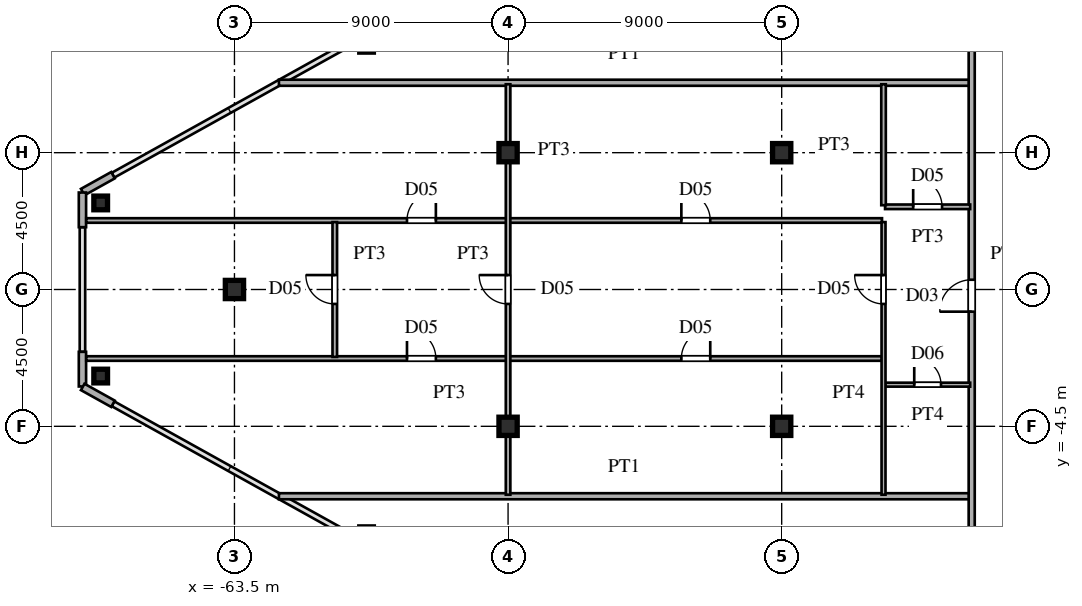
"""IFC4 building model, lengths in metres.
Left out: names, types, materials, properties, quantities, classifications, styles, units other than length and angle.
Written with IfcOpenShell. Run it as: python <this file> out.ifc"""

import sys

from ifc_helpers import new_model, si_unit, direction, frame, frame_2d, origin, origin_2d, place, context, subcontext, project, spatial, rectangle, hollow_rectangle, i_section, extrude, source, transform, mapped, element, fill, save


model = new_model("IFC4")
c1 = context("Model", 3, precision=1e-05, world=origin(), true_north=direction((0.0, 1.0)))
c2 = subcontext(c1, "Body", "Model", "MODEL_VIEW")
j1 = project(units=[si_unit("LENGTHUNIT", "METRE"), si_unit("PLANEANGLEUNIT", "RADIAN")], contexts=[c1])
p1 = place(None, origin())
s1 = spatial("IfcSite", under=j1, at=p1, CompositionType="ELEMENT")
p2 = place(p1, origin())
s2 = spatial("IfcBuilding", under=s1, at=p2, CompositionType="ELEMENT")
p3 = place(p2, frame((0.0, 0.0, 192.3)))
s3 = spatial("IfcBuildingStorey", under=s2, at=p3, CompositionType="ELEMENT", Elevation=192.3)
m1 = source(origin(), c2, "Body", "SweptSolid", [
    extrude(i_section(OverallWidth=0.6, OverallDepth=0.6, WebThickness=0.025, FlangeThickness=0.04, at=origin_2d()), origin(), (0.0, 0.0, 1.0), 3.6),
])
for number, where, z_axis, x_axis in (
    (1, (-45.5, -4.5, 0.0), (0.0, 0.0, 1.0), (1.0, 0.0, 0.0)),
    (2, (-45.5, 4.5, 0.0), (0.0, 0.0, 1.0), (1.0, 0.0, 0.0)),
    (3, (-54.5, -4.5, 0.0), (0.0, 0.0, 1.0), (1.0, 0.0, 0.0)),
    (4, (-54.5, 4.5, 0.0), (0.0, 0.0, 1.0), (1.0, 0.0, 0.0)),
    (5, (-63.5, 0.0, 0.0), (0.0, 0.0, 1.0), (1.0, 0.0, 0.0)),
):
    element("IfcColumn", number, at=place(p3, frame(where, z_axis=z_axis, x_axis=x_axis)), inside=s3, PredefinedType="COLUMN", context=c2, shape_type="MappedRepresentation", body=[
        mapped(m1, transform((0.0, 0.0, 0.0), scale=1.0)),
    ])
m2 = source(origin(), c2, "Body", "SweptSolid", [
    extrude(hollow_rectangle(XDim=0.45, YDim=0.45, WallThickness=0.018, at=origin_2d()), origin(), (0.0, 0.0, 1.0), 3.6),
])
for number, where, z_axis, x_axis in (
    (6, (-67.9, 2.847, 0.0), (0.0, 0.0, 1.0), (1.0, 0.0, 0.0)),
    (7, (-67.9, -2.847, 0.0), (0.0, 0.0, 1.0), (1.0, 0.0, 0.0)),
):
    element("IfcColumn", number, at=place(p3, frame(where, z_axis=z_axis, x_axis=x_axis)), inside=s3, PredefinedType="COLUMN", context=c2, shape_type="MappedRepresentation", body=[
        mapped(m2, transform((0.0, 0.0, 0.0), scale=1.0)),
    ])
for number, where, z_axis, x_axis in (
    (8, (-67.495, 3.759, 0.0), (0.0, 0.0, 1.0), (-0.874, -0.486, 0.0)),
    (9, (-68.5, 3.19, 0.0), (0.0, 0.0, 1.0), (0.0, -1.0, 0.0)),
    (10, (-68.5, -2.05, 0.0), (0.0, 0.0, 1.0), (0.0, -1.0, 0.0)),
    (11, (-68.491, -3.205, 0.0), (0.0, 0.0, 1.0), (0.874, -0.486, 0.0)),
):
    element("IfcWall", number, at=place(p3, frame(where, z_axis=z_axis, x_axis=x_axis)), inside=s3, PredefinedType="SOLIDWALL", context=c2, shape_type="SweptSolid", body=[
        extrude(rectangle(XDim=1.14, YDim=0.24, at=frame_2d((0.57, 0.0))), origin(), (0.0, 0.0, 1.0), 3.38),
    ])
p4 = place(p3, frame((-62.037, -6.8, 0.0), z_axis=(0.0, 0.0, 1.0), x_axis=(1.0, 0.0, 0.0)))
e12 = element("IfcWall", 12, at=p4, inside=s3, PredefinedType="PARTITIONING", context=c2, shape_type="SweptSolid", body=[
    extrude(rectangle(XDim=22.707, YDim=0.2, at=frame_2d((11.354, 0.0))), origin(), (0.0, 0.0, 1.0), 3.38),
])
p5 = place(p3, frame((-42.1, -3.13, 0.0), z_axis=(0.0, 0.0, 1.0), x_axis=(1.0, 0.0, 0.0)))
e13 = element("IfcWall", 13, at=p5, inside=s3, PredefinedType="PARTITIONING", context=c2, shape_type="SweptSolid", body=[
    extrude(rectangle(XDim=2.8, YDim=0.13, at=frame_2d((1.4, 0.0))), origin(), (0.0, 0.0, 1.0), 3.38),
])
p6 = place(p5, frame((0.96, 0.0, 0.0)))
e14 = element("IfcOpeningElement", 14, at=p6, cuts=e13, PredefinedType="OPENING", context=c2, shape_type="SweptSolid", body=[
    extrude(rectangle(XDim=0.88, YDim=2.1, at=frame_2d((0.44, 1.05))), frame((0.0, 0.075, 0.0), z_axis=(0.0, -1.0, 0.0), x_axis=(1.0, 0.0, 0.0)), (0.0, 0.0, 1.0), 0.15),
])
p7 = place(p3, frame((-68.375, -2.27, 0.0), z_axis=(0.0, 0.0, 1.0), x_axis=(1.0, 0.0, 0.0)))
e15 = element("IfcWall", 15, at=p7, inside=s3, PredefinedType="PARTITIONING", context=c2, shape_type="SweptSolid", body=[
    extrude(rectangle(XDim=26.175, YDim=0.15, at=frame_2d((13.087, 0.0))), origin(), (0.0, 0.0, 1.0), 3.38),
])
p8 = place(p7, frame((19.575, 0.0, 0.0)))
e16 = element("IfcOpeningElement", 16, at=p8, cuts=e15, PredefinedType="OPENING", context=c2, shape_type="SweptSolid", body=[
    extrude(rectangle(XDim=0.95, YDim=2.15, at=frame_2d((0.475, 1.075))), frame((0.0, 0.085, 0.0), z_axis=(0.0, -1.0, 0.0), x_axis=(1.0, 0.0, 0.0)), (0.0, 0.0, 1.0), 0.17),
])
p9 = place(p7, frame((10.55, 0.0, 0.0)))
e17 = element("IfcOpeningElement", 17, at=p9, cuts=e15, PredefinedType="OPENING", context=c2, shape_type="SweptSolid", body=[
    extrude(rectangle(XDim=0.95, YDim=2.15, at=frame_2d((0.475, 1.075))), frame((0.0, 0.085, 0.0), z_axis=(0.0, -1.0, 0.0), x_axis=(1.0, 0.0, 0.0)), (0.0, 0.0, 1.0), 0.17),
])
p10 = place(p3, frame((-68.375, 2.27, 0.0), z_axis=(0.0, 0.0, 1.0), x_axis=(1.0, 0.0, 0.0)))
e18 = element("IfcWall", 18, at=p10, inside=s3, PredefinedType="PARTITIONING", context=c2, shape_type="SweptSolid", body=[
    extrude(rectangle(XDim=26.175, YDim=0.15, at=frame_2d((13.087, 0.0))), origin(), (0.0, 0.0, 1.0), 3.38),
])
p11 = place(p10, frame((19.575, 0.0, 0.0)))
e19 = element("IfcOpeningElement", 19, at=p11, cuts=e18, PredefinedType="OPENING", context=c2, shape_type="SweptSolid", body=[
    extrude(rectangle(XDim=0.95, YDim=2.15, at=frame_2d((0.475, 1.075))), frame((0.0, 0.085, 0.0), z_axis=(0.0, -1.0, 0.0), x_axis=(1.0, 0.0, 0.0)), (0.0, 0.0, 1.0), 0.17),
])
p12 = place(p10, frame((10.55, 0.0, 0.0)))
e20 = element("IfcOpeningElement", 20, at=p12, cuts=e18, PredefinedType="OPENING", context=c2, shape_type="SweptSolid", body=[
    extrude(rectangle(XDim=0.95, YDim=2.15, at=frame_2d((0.475, 1.075))), frame((0.0, 0.085, 0.0), z_axis=(0.0, -1.0, 0.0), x_axis=(1.0, 0.0, 0.0)), (0.0, 0.0, 1.0), 0.17),
])
p13 = place(p3, frame((-42.1, 2.72, 0.0), z_axis=(0.0, 0.0, 1.0), x_axis=(1.0, 0.0, 0.0)))
e21 = element("IfcWall", 21, at=p13, inside=s3, PredefinedType="PARTITIONING", context=c2, shape_type="SweptSolid", body=[
    extrude(rectangle(XDim=2.8, YDim=0.15, at=frame_2d((1.4, 0.0))), origin(), (0.0, 0.0, 1.0), 3.38),
])
p14 = place(p13, frame((0.925, 0.0, 0.0)))
e22 = element("IfcOpeningElement", 22, at=p14, cuts=e21, PredefinedType="OPENING", context=c2, shape_type="SweptSolid", body=[
    extrude(rectangle(XDim=0.95, YDim=2.15, at=frame_2d((0.475, 1.075))), frame((0.0, 0.085, 0.0), z_axis=(0.0, -1.0, 0.0), x_axis=(1.0, 0.0, 0.0)), (0.0, 0.0, 1.0), 0.17),
])
p15 = place(p3, frame((-62.037, 6.8, 0.0), z_axis=(0.0, 0.0, 1.0), x_axis=(1.0, 0.0, 0.0)))
e23 = element("IfcWall", 23, at=p15, inside=s3, PredefinedType="PARTITIONING", context=c2, shape_type="SweptSolid", body=[
    extrude(rectangle(XDim=22.707, YDim=0.2, at=frame_2d((11.354, 0.0))), origin(), (0.0, 0.0, 1.0), 3.38),
])
p16 = place(p3, frame((-60.2, -2.217, 0.0), z_axis=(0.0, 0.0, 1.0), x_axis=(0.0, 1.0, 0.0)))
e24 = element("IfcWall", 24, at=p16, inside=s3, PredefinedType="PARTITIONING", context=c2, shape_type="SweptSolid", body=[
    extrude(rectangle(XDim=4.434, YDim=0.15, at=frame_2d((2.217, 0.0))), origin(), (0.0, 0.0, 1.0), 3.38),
])
p17 = place(p16, frame((1.742, 0.0, 0.0)))
e25 = element("IfcOpeningElement", 25, at=p17, cuts=e24, PredefinedType="OPENING", context=c2, shape_type="SweptSolid", body=[
    extrude(rectangle(XDim=0.95, YDim=2.15, at=frame_2d((0.475, 1.075))), frame((0.0, 0.085, 0.0), z_axis=(0.0, -1.0, 0.0), x_axis=(1.0, 0.0, 0.0)), (0.0, 0.0, 1.0), 0.17),
])
p18 = place(p3, frame((-54.5, -6.75, 0.0), z_axis=(0.0, 0.0, 1.0), x_axis=(0.0, 1.0, 0.0)))
e26 = element("IfcWall", 26, at=p18, inside=s3, PredefinedType="PARTITIONING", context=c2, shape_type="SweptSolid", body=[
    extrude(rectangle(XDim=13.5, YDim=0.15, at=frame_2d((6.75, 0.0))), origin(), (0.0, 0.0, 1.0), 2.78),
])
p19 = place(p18, frame((6.275, 0.0, 0.0)))
e27 = element("IfcOpeningElement", 27, at=p19, cuts=e26, PredefinedType="OPENING", context=c2, shape_type="SweptSolid", body=[
    extrude(rectangle(XDim=0.95, YDim=2.15, at=frame_2d((0.475, 1.075))), frame((0.0, 0.085, 0.0), z_axis=(0.0, -1.0, 0.0), x_axis=(1.0, 0.0, 0.0)), (0.0, 0.0, 1.0), 0.17),
])
p20 = place(p3, frame((-42.15, -6.75, 0.0), z_axis=(0.0, 0.0, 1.0), x_axis=(0.0, 1.0, 0.0)))
e28 = element("IfcWall", 28, at=p20, inside=s3, PredefinedType="PARTITIONING", context=c2, shape_type="SweptSolid", body=[
    extrude(rectangle(XDim=8.967, YDim=0.13, at=frame_2d((4.483, 0.0))), origin(), (0.0, 0.0, 1.0), 3.38),
])
p21 = place(p20, frame((6.275, 0.0, 0.0)))
e29 = element("IfcOpeningElement", 29, at=p21, cuts=e28, PredefinedType="OPENING", context=c2, shape_type="SweptSolid", body=[
    extrude(rectangle(XDim=0.95, YDim=2.15, at=frame_2d((0.475, 1.075))), frame((0.0, 0.075, 0.0), z_axis=(0.0, -1.0, 0.0), x_axis=(1.0, 0.0, 0.0)), (0.0, 0.0, 1.0), 0.15),
])
p22 = place(p3, frame((-42.15, 2.772, 0.0), z_axis=(0.0, 0.0, 1.0), x_axis=(0.0, 1.0, 0.0)))
e30 = element("IfcWall", 30, at=p22, inside=s3, PredefinedType="PARTITIONING", context=c2, shape_type="SweptSolid", body=[
    extrude(rectangle(XDim=3.978, YDim=0.15, at=frame_2d((1.989, 0.0))), origin(), (0.0, 0.0, 1.0), 3.38),
])
p23 = place(p3, frame((-39.25, -15.715, 0.0), z_axis=(0.0, 0.0, 1.0), x_axis=(0.0, 1.0, 0.0)))
e31 = element("IfcWall", 31, at=p23, inside=s3, PredefinedType="PARTITIONING", context=c2, shape_type="SweptSolid", body=[
    extrude(rectangle(XDim=31.43, YDim=0.2, at=frame_2d((15.715, 0.0))), origin(), (0.0, 0.0, 1.0), 3.38),
])
p24 = place(p23, frame((3.89, 0.0, 0.0)))
e32 = element("IfcOpeningElement", 32, at=p24, cuts=e31, PredefinedType="OPENING", context=c2, shape_type="SweptSolid", body=[
    extrude(rectangle(XDim=1.05, YDim=2.25, at=frame_2d((0.525, 1.125))), frame((0.0, 0.11, 0.0), z_axis=(0.0, -1.0, 0.0), x_axis=(1.0, 0.0, 0.0)), (0.0, 0.0, 1.0), 0.22),
])
p25 = place(p23, frame((14.986, 0.0, 0.0)))
e33 = element("IfcOpeningElement", 33, at=p25, cuts=e31, PredefinedType="OPENING", context=c2, shape_type="SweptSolid", body=[
    extrude(rectangle(XDim=1.05, YDim=2.25, at=frame_2d((0.525, 1.125))), frame((0.0, 0.11, 0.0), z_axis=(0.0, -1.0, 0.0), x_axis=(1.0, 0.0, 0.0)), (0.0, 0.0, 1.0), 0.22),
])
p26 = place(p23, frame((26.49, 0.0, 0.0)))
e34 = element("IfcOpeningElement", 34, at=p26, cuts=e31, PredefinedType="OPENING", context=c2, shape_type="SweptSolid", body=[
    extrude(rectangle(XDim=1.05, YDim=2.25, at=frame_2d((0.525, 1.125))), frame((0.0, 0.11, 0.0), z_axis=(0.0, -1.0, 0.0), x_axis=(1.0, 0.0, 0.0)), (0.0, 0.0, 1.0), 0.22),
])
m3 = source(origin(), c2, "Body", "SweptSolid", [
    extrude(rectangle(XDim=0.88, YDim=2.1, at=frame_2d((0.44, 1.05))), frame((0.0, 0.025, 0.0), z_axis=(0.0, -1.0, 0.0), x_axis=(1.0, 0.0, 0.0)), (0.0, 0.0, 1.0), 0.05),
])
p27 = place(p6, origin())
e35 = element("IfcDoor", 35, at=p27, inside=s3, OperationType="SINGLE_SWING_LEFT", PredefinedType="DOOR", context=c2, shape_type="MappedRepresentation", body=[
    mapped(m3, transform((0.0, 0.0, 0.0), scale=1.0)),
])
fill(e14, e35)
m4 = source(origin(), c2, "Body", "SweptSolid", [
    extrude(rectangle(XDim=0.95, YDim=2.15, at=frame_2d((0.475, 1.075))), frame((0.0, 0.025, 0.0), z_axis=(0.0, -1.0, 0.0), x_axis=(1.0, 0.0, 0.0)), (0.0, 0.0, 1.0), 0.05),
])
p28 = place(p8, origin())
e36 = element("IfcDoor", 36, at=p28, inside=s3, OperationType="SINGLE_SWING_RIGHT", PredefinedType="DOOR", context=c2, shape_type="MappedRepresentation", body=[
    mapped(m4, transform((0.0, 0.0, 0.0), scale=1.0)),
])
fill(e16, e36)
p29 = place(p9, origin())
e37 = element("IfcDoor", 37, at=p29, inside=s3, OperationType="SINGLE_SWING_LEFT", PredefinedType="DOOR", context=c2, shape_type="MappedRepresentation", body=[
    mapped(m4, transform((0.0, 0.0, 0.0), scale=1.0)),
])
fill(e17, e37)
p30 = place(p11, origin())
e38 = element("IfcDoor", 38, at=p30, inside=s3, OperationType="SINGLE_SWING_LEFT", PredefinedType="DOOR", context=c2, shape_type="MappedRepresentation", body=[
    mapped(m4, transform((0.0, 0.0, 0.0), scale=1.0)),
])
fill(e19, e38)
p31 = place(p12, origin())
e39 = element("IfcDoor", 39, at=p31, inside=s3, OperationType="SINGLE_SWING_RIGHT", PredefinedType="DOOR", context=c2, shape_type="MappedRepresentation", body=[
    mapped(m4, transform((0.0, 0.0, 0.0), scale=1.0)),
])
fill(e20, e39)
p32 = place(p14, origin())
e40 = element("IfcDoor", 40, at=p32, inside=s3, OperationType="SINGLE_SWING_LEFT", PredefinedType="DOOR", context=c2, shape_type="MappedRepresentation", body=[
    mapped(m4, transform((0.0, 0.0, 0.0), scale=1.0)),
])
fill(e22, e40)
p33 = place(p17, origin())
e41 = element("IfcDoor", 41, at=p33, inside=s3, OperationType="SINGLE_SWING_RIGHT", PredefinedType="DOOR", context=c2, shape_type="MappedRepresentation", body=[
    mapped(m4, transform((0.0, 0.0, 0.0), scale=1.0)),
])
fill(e25, e41)
p34 = place(p19, origin())
e42 = element("IfcDoor", 42, at=p34, inside=s3, OperationType="SINGLE_SWING_RIGHT", PredefinedType="DOOR", context=c2, shape_type="MappedRepresentation", body=[
    mapped(m4, transform((0.0, 0.0, 0.0), scale=1.0)),
])
fill(e27, e42)
p35 = place(p21, origin())
e43 = element("IfcDoor", 43, at=p35, inside=s3, OperationType="SINGLE_SWING_RIGHT", PredefinedType="DOOR", context=c2, shape_type="MappedRepresentation", body=[
    mapped(m4, transform((0.0, 0.0, 0.0), scale=1.0)),
])
fill(e29, e43)
m5 = source(origin(), c2, "Body", "SweptSolid", [
    extrude(rectangle(XDim=1.05, YDim=2.25, at=frame_2d((0.525, 1.125))), frame((0.0, 0.025, 0.0), z_axis=(0.0, -1.0, 0.0), x_axis=(1.0, 0.0, 0.0)), (0.0, 0.0, 1.0), 0.05),
])
p36 = place(p25, origin())
e44 = element("IfcDoor", 44, at=p36, inside=s3, OperationType="SINGLE_SWING_LEFT", PredefinedType="DOOR", context=c2, shape_type="MappedRepresentation", body=[
    mapped(m5, transform((0.0, 0.0, 0.0), scale=1.0)),
])
fill(e33, e44)
save(model, sys.argv[1])
